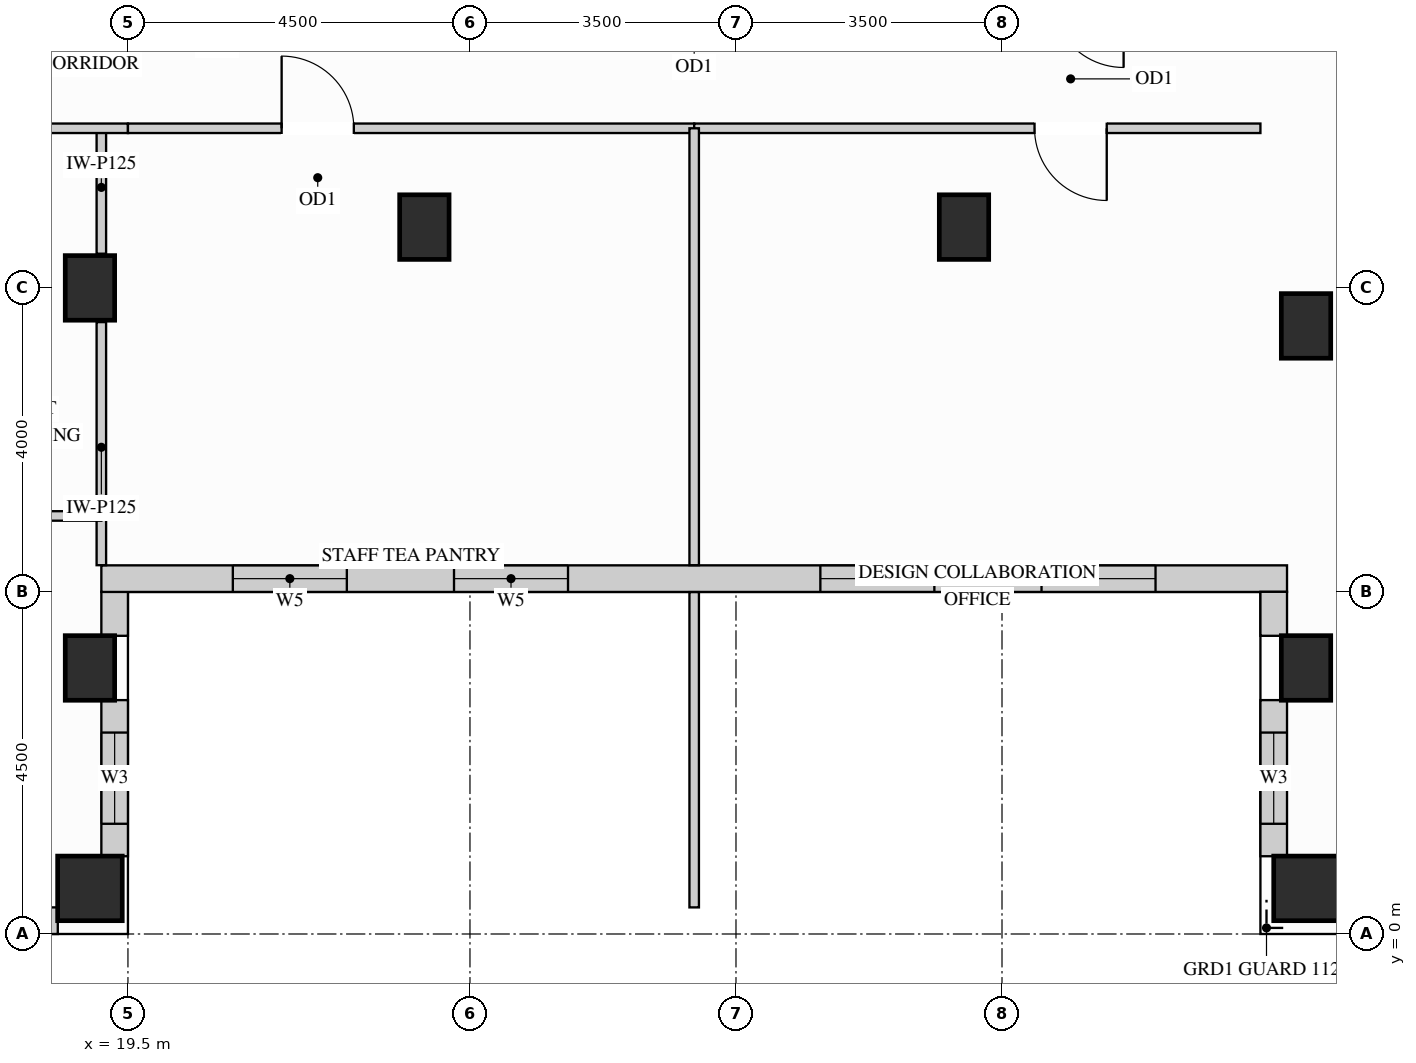
"""IFC4 building model, lengths in metres.
Left out: names, types, materials, properties, quantities, classifications, styles, units other than length and angle.
Written with IfcOpenShell. Run it as: python <this file> out.ifc"""

import sys

from ifc_helpers import new_model, si_unit, direction, frame, frame_2d, origin, origin_2d, place, context, subcontext, project, spatial, rectangle, extrude, source, transform, mapped, element, fill, save


model = new_model("IFC4")
c1 = context("Model", 3, precision=1e-05, world=origin(), true_north=direction((0.0, 1.0)))
c2 = subcontext(c1, "Body", "Model", "MODEL_VIEW")
j1 = project(units=[si_unit("LENGTHUNIT", "METRE"), si_unit("PLANEANGLEUNIT", "RADIAN")], contexts=[c1])
p1 = place(None, origin())
s1 = spatial("IfcSite", under=j1, at=p1, CompositionType="ELEMENT")
p2 = place(p1, origin())
s2 = spatial("IfcBuilding", under=s1, at=p2, CompositionType="ELEMENT")
p3 = place(p2, frame((0.0, 0.0, 216.0)))
s3 = spatial("IfcBuildingStorey", under=s2, at=p3, CompositionType="ELEMENT", Elevation=216.0)
m1 = source(origin(), c2, "Body", "SweptSolid", [
    extrude(rectangle(XDim=0.65, YDim=0.85, at=origin_2d()), origin(), (0.0, 0.0, 1.0), 3.4),
])
for number, where, z_axis, x_axis in (
    (1, (19.0, 3.5, 0.0), (0.0, 0.0, 1.0), (1.0, 0.0, 0.0)),
    (2, (19.0, 8.5, 0.0), (0.0, 0.0, 1.0), (1.0, 0.0, 0.0)),
    (3, (35.0, 3.5, 0.0), (0.0, 0.0, 1.0), (1.0, 0.0, 0.0)),
    (4, (35.0, 8.0, 0.0), (0.0, 0.0, 1.0), (1.0, 0.0, 0.0)),
    (5, (23.4, 9.3, 0.0), (0.0, 0.0, 1.0), (1.0, 0.0, 0.0)),
    (6, (30.5, 9.3, 0.0), (0.0, 0.0, 1.0), (1.0, 0.0, 0.0)),
):
    element("IfcColumn", number, at=place(p3, frame(where, z_axis=z_axis, x_axis=x_axis)), inside=s3, PredefinedType="COLUMN", context=c2, shape_type="MappedRepresentation", body=[
        mapped(m1, transform((0.0, 0.0, 0.0), x_axis=(1.0, 0.0, 0.0), y_axis=(0.0, 1.0, 0.0), z_axis=(0.0, 0.0, 1.0))),
    ])
m2 = source(origin(), c2, "Body", "SweptSolid", [
    extrude(rectangle(XDim=0.85, YDim=0.85, at=origin_2d()), origin(), (0.0, 0.0, 1.0), 3.4),
])
for number, where, z_axis, x_axis in (
    (7, (19.0, 0.6, 0.0), (0.0, 0.0, 1.0), (1.0, 0.0, 0.0)),
    (8, (35.0, 0.6, 0.0), (0.0, 0.0, 1.0), (1.0, 0.0, 0.0)),
):
    element("IfcColumn", number, at=place(p3, frame(where, z_axis=z_axis, x_axis=x_axis)), inside=s3, PredefinedType="COLUMN", context=c2, shape_type="MappedRepresentation", body=[
        mapped(m2, transform((0.0, 0.0, 0.0), x_axis=(1.0, 0.0, 0.0), y_axis=(0.0, 1.0, 0.0), z_axis=(0.0, 0.0, 1.0))),
    ])
p4 = place(p3, frame((14.923, 0.175, 0.0), z_axis=(0.0, 0.0, 1.0), x_axis=(1.0, 0.0, 0.0)))
e9 = element("IfcWall", 9, at=p4, inside=s3, PredefinedType="SOLIDWALL", context=c2, shape_type="SweptSolid", body=[
    extrude(rectangle(XDim=3.654, YDim=0.35, at=frame_2d((1.827, 0.0))), origin(), (0.0, 0.0, 1.0), 3.385),
])
p5 = place(p4, frame((0.627, 0.0, 0.78)))
e10 = element("IfcOpeningElement", 10, at=p5, cuts=e9, PredefinedType="OPENING", context=c2, shape_type="SweptSolid", body=[
    extrude(rectangle(XDim=2.4, YDim=2.1, at=frame_2d((1.2, 1.05))), frame((0.0, 0.185, 0.0), z_axis=(0.0, -1.0, 0.0), x_axis=(1.0, 0.0, 0.0)), (0.0, 0.0, 1.0), 0.37),
])
p6 = place(p3, frame((19.325, 1.023, 0.0), z_axis=(0.0, 0.0, 1.0), x_axis=(0.0, 1.0, 0.0)))
e11 = element("IfcWall", 11, at=p6, inside=s3, PredefinedType="SOLIDWALL", context=c2, shape_type="SweptSolid", body=[
    extrude(rectangle(XDim=2.054, YDim=0.35, at=frame_2d((1.027, 0.0))), origin(), (0.0, 0.0, 1.0), 2.619),
])
p7 = place(p6, frame((0.427, 0.0, 0.78)))
e12 = element("IfcOpeningElement", 12, at=p7, cuts=e11, PredefinedType="OPENING", context=c2, shape_type="SweptSolid", body=[
    extrude(rectangle(XDim=1.2, YDim=1.659, at=frame_2d((0.6, 0.83))), frame((0.0, 0.185, 0.0), z_axis=(0.0, -1.0, 0.0), x_axis=(1.0, 0.0, 0.0)), (0.0, 0.0, 1.0), 0.37),
])
m3 = source(origin(), c2, "Body", "SweptSolid", [
    extrude(rectangle(XDim=0.579, YDim=0.35, at=frame_2d((0.29, 0.0))), origin(), (0.0, 0.0, 1.0), 2.773),
])
p8 = place(p3, frame((19.325, 3.923, 0.0), z_axis=(0.0, 0.0, 1.0), x_axis=(0.0, 1.0, 0.0)))
e13 = element("IfcWall", 13, at=p8, inside=s3, PredefinedType="SOLIDWALL", context=c2, shape_type="MappedRepresentation", body=[
    mapped(m3, transform((0.0, 0.0, 0.0), x_axis=(1.0, 0.0, 0.0), y_axis=(0.0, 1.0, 0.0), z_axis=(0.0, 0.0, 1.0))),
])
p9 = place(p3, frame((19.15, 4.675, 0.0), z_axis=(0.0, 0.0, 1.0), x_axis=(1.0, 0.0, 0.0)))
e14 = element("IfcWall", 14, at=p9, inside=s3, PredefinedType="SOLIDWALL", context=c2, shape_type="SweptSolid", body=[
    extrude(rectangle(XDim=15.6, YDim=0.35, at=frame_2d((7.8, 0.0))), origin(), (0.0, 0.0, 1.0), 3.385),
])
p10 = place(p9, frame((1.73, 0.0, 0.78)))
e15 = element("IfcOpeningElement", 15, at=p10, cuts=e14, PredefinedType="OPENING", context=c2, shape_type="SweptSolid", body=[
    extrude(rectangle(XDim=1.5, YDim=2.0, at=frame_2d((0.75, 1.0))), frame((0.0, 0.185, 0.0), z_axis=(0.0, -1.0, 0.0), x_axis=(1.0, 0.0, 0.0)), (0.0, 0.0, 1.0), 0.37),
])
p11 = place(p9, frame((4.64, 0.0, 0.78)))
e16 = element("IfcOpeningElement", 16, at=p11, cuts=e14, PredefinedType="OPENING", context=c2, shape_type="SweptSolid", body=[
    extrude(rectangle(XDim=1.5, YDim=2.0, at=frame_2d((0.75, 1.0))), frame((0.0, 0.185, 0.0), z_axis=(0.0, -1.0, 0.0), x_axis=(1.0, 0.0, 0.0)), (0.0, 0.0, 1.0), 0.37),
])
p12 = place(p9, frame((9.46, 0.0, 0.78)))
e17 = element("IfcOpeningElement", 17, at=p12, cuts=e14, PredefinedType="OPENING", context=c2, shape_type="SweptSolid", body=[
    extrude(rectangle(XDim=1.5, YDim=2.0, at=frame_2d((0.75, 1.0))), frame((0.0, 0.185, 0.0), z_axis=(0.0, -1.0, 0.0), x_axis=(1.0, 0.0, 0.0)), (0.0, 0.0, 1.0), 0.37),
])
p13 = place(p9, frame((12.37, 0.0, 0.78)))
e18 = element("IfcOpeningElement", 18, at=p13, cuts=e14, PredefinedType="OPENING", context=c2, shape_type="SweptSolid", body=[
    extrude(rectangle(XDim=1.5, YDim=2.0, at=frame_2d((0.75, 1.0))), frame((0.0, 0.185, 0.0), z_axis=(0.0, -1.0, 0.0), x_axis=(1.0, 0.0, 0.0)), (0.0, 0.0, 1.0), 0.37),
])
m4 = source(origin(), c2, "Body", "SweptSolid", [
    extrude(rectangle(XDim=0.579, YDim=0.35, at=frame_2d((0.29, 0.0))), origin(), (0.0, 0.0, 1.0), 3.385),
])
p14 = place(p3, frame((34.575, 4.502, 0.0), z_axis=(0.0, 0.0, 1.0), x_axis=(0.0, -1.0, 0.0)))
e19 = element("IfcWall", 19, at=p14, inside=s3, PredefinedType="SOLIDWALL", context=c2, shape_type="MappedRepresentation", body=[
    mapped(m4, transform((0.0, 0.0, 0.0), x_axis=(1.0, 0.0, 0.0), y_axis=(0.0, 1.0, 0.0), z_axis=(0.0, 0.0, 1.0))),
])
p15 = place(p3, frame((34.575, 3.077, 0.0), z_axis=(0.0, 0.0, 1.0), x_axis=(0.0, -1.0, 0.0)))
e20 = element("IfcWall", 20, at=p15, inside=s3, PredefinedType="SOLIDWALL", context=c2, shape_type="SweptSolid", body=[
    extrude(rectangle(XDim=2.054, YDim=0.35, at=frame_2d((1.027, 0.0))), origin(), (0.0, 0.0, 1.0), 3.385),
])
p16 = place(p15, frame((0.427, 0.0, 0.78)))
e21 = element("IfcOpeningElement", 21, at=p16, cuts=e20, PredefinedType="OPENING", context=c2, shape_type="SweptSolid", body=[
    extrude(rectangle(XDim=1.2, YDim=2.0, at=frame_2d((0.6, 1.0))), frame((0.0, 0.185, 0.0), z_axis=(0.0, -1.0, 0.0), x_axis=(1.0, 0.0, 0.0)), (0.0, 0.0, 1.0), 0.37),
])
m5 = source(origin(), c2, "Body", "SweptSolid", [
    extrude(rectangle(XDim=3.198, YDim=0.125, at=frame_2d((1.599, 0.0))), origin(), (0.0, 0.0, 1.0), 2.773),
])
p17 = place(p3, frame((19.15, 4.852, 0.0), z_axis=(0.0, 0.0, 1.0), x_axis=(0.0, 1.0, 0.0)))
e22 = element("IfcWall", 22, at=p17, inside=s3, PredefinedType="PARTITIONING", context=c2, shape_type="MappedRepresentation", body=[
    mapped(m5, transform((0.0, 0.0, 0.0), x_axis=(1.0, 0.0, 0.0), y_axis=(0.0, 1.0, 0.0), z_axis=(0.0, 0.0, 1.0))),
])
m6 = source(origin(), c2, "Body", "SweptSolid", [
    extrude(rectangle(XDim=1.65, YDim=0.125, at=frame_2d((0.825, 0.0))), origin(), (0.0, 0.0, 1.0), 2.773),
])
p18 = place(p3, frame((19.15, 8.95, 0.0), z_axis=(0.0, 0.0, 1.0), x_axis=(0.0, 1.0, 0.0)))
e23 = element("IfcWall", 23, at=p18, inside=s3, PredefinedType="PARTITIONING", context=c2, shape_type="MappedRepresentation", body=[
    mapped(m6, transform((0.0, 0.0, 0.0), x_axis=(1.0, 0.0, 0.0), y_axis=(0.0, 1.0, 0.0), z_axis=(0.0, 0.0, 1.0))),
])
m7 = source(origin(), c2, "Body", "SweptSolid", [
    extrude(rectangle(XDim=2.45, YDim=0.125, at=frame_2d((1.225, 0.0))), origin(), (0.0, 0.0, 1.0), 3.385),
])
p19 = place(p3, frame((17.05, 10.6, 0.0), z_axis=(0.0, 0.0, 1.0), x_axis=(1.0, 0.0, 0.0)))
e24 = element("IfcWall", 24, at=p19, inside=s3, PredefinedType="PARTITIONING", context=c2, shape_type="MappedRepresentation", body=[
    mapped(m7, transform((0.0, 0.0, 0.0), x_axis=(1.0, 0.0, 0.0), y_axis=(0.0, 1.0, 0.0), z_axis=(0.0, 0.0, 1.0))),
])
p20 = place(p3, frame((19.5, 10.6, 0.0), z_axis=(0.0, 0.0, 1.0), x_axis=(1.0, 0.0, 0.0)))
e25 = element("IfcWall", 25, at=p20, inside=s3, PredefinedType="PARTITIONING", context=c2, shape_type="SweptSolid", body=[
    extrude(rectangle(XDim=7.45, YDim=0.125, at=frame_2d((3.725, 0.0))), origin(), (0.0, 0.0, 1.0), 3.385),
])
p21 = place(p20, frame((2.022, 0.0, 0.0)))
e26 = element("IfcOpeningElement", 26, at=p21, cuts=e25, PredefinedType="OPENING", context=c2, shape_type="SweptSolid", body=[
    extrude(rectangle(XDim=0.95, YDim=2.15, at=frame_2d((0.475, 1.075))), frame((0.0, 0.073, 0.0), z_axis=(0.0, -1.0, 0.0), x_axis=(1.0, 0.0, 0.0)), (0.0, 0.0, 1.0), 0.145),
])
p22 = place(p3, frame((26.95, 10.6, 0.0), z_axis=(0.0, 0.0, 1.0), x_axis=(1.0, 0.0, 0.0)))
e27 = element("IfcWall", 27, at=p22, inside=s3, PredefinedType="PARTITIONING", context=c2, shape_type="SweptSolid", body=[
    extrude(rectangle(XDim=7.45, YDim=0.125, at=frame_2d((3.725, 0.0))), origin(), (0.0, 0.0, 1.0), 3.385),
])
p23 = place(p22, frame((4.478, 0.0, 0.0)))
e28 = element("IfcOpeningElement", 28, at=p23, cuts=e27, PredefinedType="OPENING", context=c2, shape_type="SweptSolid", body=[
    extrude(rectangle(XDim=0.95, YDim=2.15, at=frame_2d((0.475, 1.075))), frame((0.0, 0.073, 0.0), z_axis=(0.0, -1.0, 0.0), x_axis=(1.0, 0.0, 0.0)), (0.0, 0.0, 1.0), 0.145),
])
m8 = source(origin(), c2, "Body", "SweptSolid", [
    extrude(rectangle(XDim=4.148, YDim=0.125, at=frame_2d((2.074, 0.0))), origin(), (0.0, 0.0, 1.0), 3.385),
])
p24 = place(p3, frame((26.95, 0.35, 0.0), z_axis=(0.0, 0.0, 1.0), x_axis=(0.0, 1.0, 0.0)))
e29 = element("IfcWall", 29, at=p24, inside=s3, PredefinedType="PARTITIONING", context=c2, shape_type="MappedRepresentation", body=[
    mapped(m8, transform((0.0, 0.0, 0.0), x_axis=(1.0, 0.0, 0.0), y_axis=(0.0, 1.0, 0.0), z_axis=(0.0, 0.0, 1.0))),
])
m9 = source(origin(), c2, "Body", "SweptSolid", [
    extrude(rectangle(XDim=5.748, YDim=0.125, at=frame_2d((2.874, 0.0))), origin(), (0.0, 0.0, 1.0), 3.385),
])
p25 = place(p3, frame((26.95, 4.852, 0.0), z_axis=(0.0, 0.0, 1.0), x_axis=(0.0, 1.0, 0.0)))
e30 = element("IfcWall", 30, at=p25, inside=s3, PredefinedType="PARTITIONING", context=c2, shape_type="MappedRepresentation", body=[
    mapped(m9, transform((0.0, 0.0, 0.0), x_axis=(1.0, 0.0, 0.0), y_axis=(0.0, 1.0, 0.0), z_axis=(0.0, 0.0, 1.0))),
])
m10 = source(origin(), c2, "Body", "SweptSolid", [
    extrude(rectangle(XDim=2.1, YDim=0.125, at=frame_2d((1.05, 0.0))), origin(), (0.0, 0.0, 1.0), 3.385),
])
p26 = place(p3, frame((17.05, 5.5, 0.0), z_axis=(0.0, 0.0, 1.0), x_axis=(1.0, 0.0, 0.0)))
e31 = element("IfcWall", 31, at=p26, inside=s3, PredefinedType="PARTITIONING", context=c2, shape_type="MappedRepresentation", body=[
    mapped(m10, transform((0.0, 0.0, 0.0), x_axis=(1.0, 0.0, 0.0), y_axis=(0.0, 1.0, 0.0), z_axis=(0.0, 0.0, 1.0))),
])
m11 = source(origin(), c2, "Body", "SweptSolid", [
    extrude(rectangle(XDim=0.95, YDim=2.15, at=frame_2d((0.475, 1.075))), frame((0.0, 0.025, 0.0), z_axis=(0.0, -1.0, 0.0), x_axis=(1.0, 0.0, 0.0)), (0.0, 0.0, 1.0), 0.05),
])
p27 = place(p21, origin())
e32 = element("IfcDoor", 32, at=p27, inside=s3, OperationType="SINGLE_SWING_LEFT", PredefinedType="DOOR", context=c2, shape_type="MappedRepresentation", body=[
    mapped(m11, transform((0.0, 0.0, 0.0), x_axis=(1.0, 0.0, 0.0), y_axis=(0.0, 1.0, 0.0), z_axis=(0.0, 0.0, 1.0))),
])
fill(e26, e32)
p28 = place(p23, origin())
e33 = element("IfcDoor", 33, at=p28, inside=s3, OperationType="SINGLE_SWING_RIGHT", PredefinedType="DOOR", context=c2, shape_type="MappedRepresentation", body=[
    mapped(m11, transform((0.0, 0.0, 0.0), x_axis=(1.0, 0.0, 0.0), y_axis=(0.0, 1.0, 0.0), z_axis=(0.0, 0.0, 1.0))),
])
fill(e28, e33)
m12 = source(origin(), c2, "Body", "SweptSolid", [
    extrude(rectangle(XDim=1.2, YDim=1.659, at=frame_2d((0.6, 0.83))), frame((0.0, 0.03, 0.0), z_axis=(0.0, -1.0, 0.0), x_axis=(1.0, 0.0, 0.0)), (0.0, 0.0, 1.0), 0.06),
])
p29 = place(p7, origin())
e34 = element("IfcWindow", 34, at=p29, inside=s3, PartitioningType="SINGLE_PANEL", PredefinedType="WINDOW", context=c2, shape_type="MappedRepresentation", body=[
    mapped(m12, transform((0.0, 0.0, 0.0), x_axis=(1.0, 0.0, 0.0), y_axis=(0.0, 1.0, 0.0), z_axis=(0.0, 0.0, 1.0))),
])
fill(e12, e34)
m13 = source(origin(), c2, "Body", "SweptSolid", [
    extrude(rectangle(XDim=1.2, YDim=2.0, at=frame_2d((0.6, 1.0))), frame((0.0, 0.03, 0.0), z_axis=(0.0, -1.0, 0.0), x_axis=(1.0, 0.0, 0.0)), (0.0, 0.0, 1.0), 0.06),
])
p30 = place(p16, origin())
e35 = element("IfcWindow", 35, at=p30, inside=s3, PartitioningType="SINGLE_PANEL", PredefinedType="WINDOW", context=c2, shape_type="MappedRepresentation", body=[
    mapped(m13, transform((0.0, 0.0, 0.0), x_axis=(1.0, 0.0, 0.0), y_axis=(0.0, 1.0, 0.0), z_axis=(0.0, 0.0, 1.0))),
])
fill(e21, e35)
m14 = source(origin(), c2, "Body", "SweptSolid", [
    extrude(rectangle(XDim=1.5, YDim=2.0, at=frame_2d((0.75, 1.0))), frame((0.0, 0.03, 0.0), z_axis=(0.0, -1.0, 0.0), x_axis=(1.0, 0.0, 0.0)), (0.0, 0.0, 1.0), 0.06),
])
p31 = place(p10, origin())
e36 = element("IfcWindow", 36, at=p31, inside=s3, PartitioningType="SINGLE_PANEL", PredefinedType="WINDOW", context=c2, shape_type="MappedRepresentation", body=[
    mapped(m14, transform((0.0, 0.0, 0.0), x_axis=(1.0, 0.0, 0.0), y_axis=(0.0, 1.0, 0.0), z_axis=(0.0, 0.0, 1.0))),
])
fill(e15, e36)
p32 = place(p11, origin())
e37 = element("IfcWindow", 37, at=p32, inside=s3, PartitioningType="SINGLE_PANEL", PredefinedType="WINDOW", context=c2, shape_type="MappedRepresentation", body=[
    mapped(m14, transform((0.0, 0.0, 0.0), x_axis=(1.0, 0.0, 0.0), y_axis=(0.0, 1.0, 0.0), z_axis=(0.0, 0.0, 1.0))),
])
fill(e16, e37)
p33 = place(p12, origin())
e38 = element("IfcWindow", 38, at=p33, inside=s3, PartitioningType="SINGLE_PANEL", PredefinedType="WINDOW", context=c2, shape_type="MappedRepresentation", body=[
    mapped(m14, transform((0.0, 0.0, 0.0), x_axis=(1.0, 0.0, 0.0), y_axis=(0.0, 1.0, 0.0), z_axis=(0.0, 0.0, 1.0))),
])
fill(e17, e38)
p34 = place(p13, origin())
e39 = element("IfcWindow", 39, at=p34, inside=s3, PartitioningType="SINGLE_PANEL", PredefinedType="WINDOW", context=c2, shape_type="MappedRepresentation", body=[
    mapped(m14, transform((0.0, 0.0, 0.0), x_axis=(1.0, 0.0, 0.0), y_axis=(0.0, 1.0, 0.0), z_axis=(0.0, 0.0, 1.0))),
])
fill(e18, e39)
save(model, sys.argv[1])
